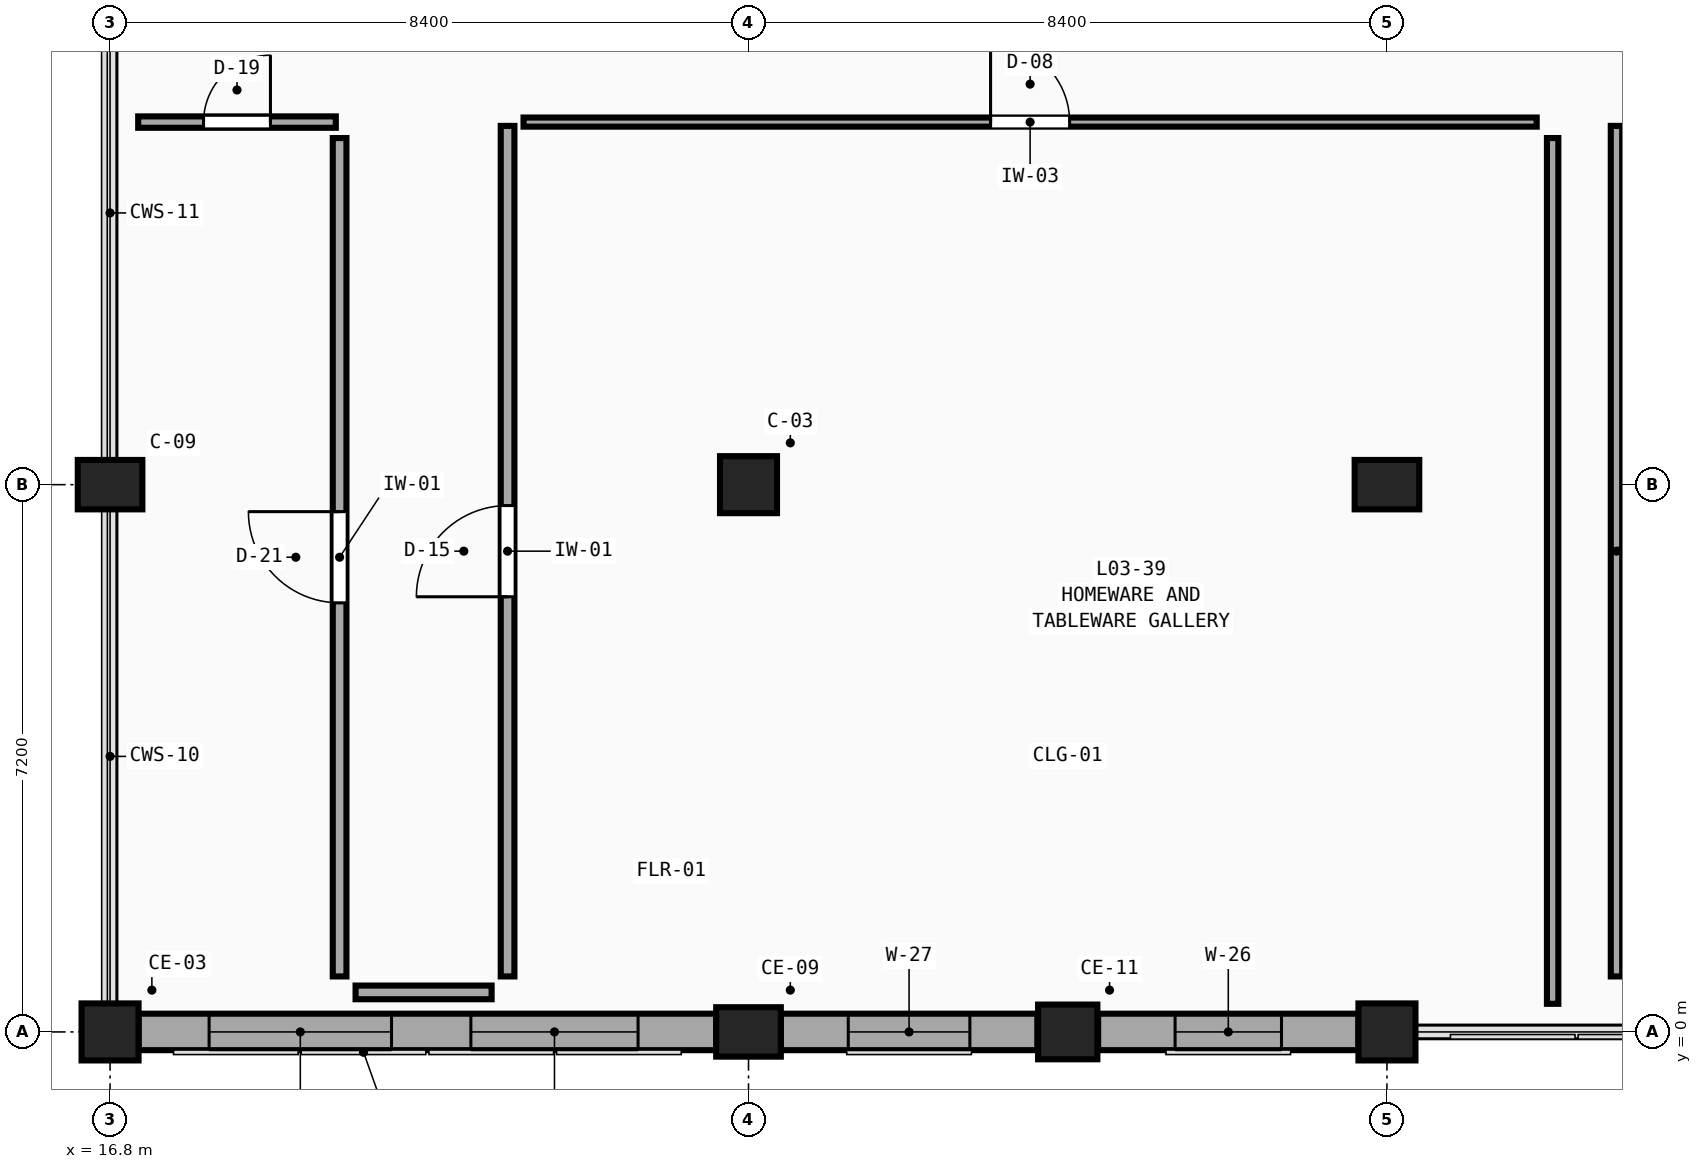
"""IFC4 building model, lengths in metres.
Left out: names, types, materials, properties, quantities, classifications, styles, units other than length and angle.
Written with IfcOpenShell. Run it as: python <this file> out.ifc"""

import sys

from ifc_helpers import new_model, si_unit, direction, frame, frame_2d, origin, origin_2d, place, context, subcontext, project, spatial, rectangle, extrude, element, fill, save


model = new_model("IFC4")
c1 = context("Model", 3, precision=1e-05, world=origin(), true_north=direction((0.0, 1.0)))
c2 = subcontext(c1, "Body", "Model", "MODEL_VIEW")
j1 = project(units=[si_unit("LENGTHUNIT", "METRE"), si_unit("PLANEANGLEUNIT", "RADIAN")], contexts=[c1])
p1 = place(None, origin())
s1 = spatial("IfcSite", under=j1, at=p1, CompositionType="ELEMENT")
p2 = place(p1, origin())
s2 = spatial("IfcBuilding", under=s1, at=p2, CompositionType="ELEMENT")
p3 = place(p2, frame((0.0, 0.0, 14.4)))
s3 = spatial("IfcBuildingStorey", under=s2, at=p3, CompositionType="ELEMENT", Elevation=14.4)
p4 = place(p3, frame((16.8, 0.0, 0.0), z_axis=(0.0, 0.0, 1.0), x_axis=(1.0, 0.0, 0.0)))
e1 = element("IfcColumn", 1, at=p4, inside=s3, PredefinedType="COLUMN", context=c2, shape_type="SweptSolid", body=[
    extrude(rectangle(XDim=0.75, YDim=0.75, at=origin_2d()), origin(), (0.0, 0.0, 1.0), 4.5),
])
for number, where, z_axis, x_axis in (
    (2, (16.8, 7.2, 0.0), (0.0, 0.0, 1.0), (1.0, 0.0, 0.0)),
    (3, (25.2, 0.0, 0.0), (0.0, 0.0, 1.0), (1.0, 0.0, 0.0)),
):
    element("IfcColumn", number, at=place(p3, frame(where, z_axis=z_axis, x_axis=x_axis)), inside=s3, PredefinedType="COLUMN", context=c2, shape_type="SweptSolid", body=[
        extrude(rectangle(XDim=0.85, YDim=0.65, at=origin_2d()), origin(), (0.0, 0.0, 1.0), 4.5),
    ])
for number, where, z_axis, x_axis in (
    (4, (25.2, 7.2, 0.0), (0.0, 0.0, 1.0), (1.0, 0.0, 0.0)),
    (5, (33.6, 0.0, 0.0), (0.0, 0.0, 1.0), (1.0, 0.0, 0.0)),
):
    element("IfcColumn", number, at=place(p3, frame(where, z_axis=z_axis, x_axis=x_axis)), inside=s3, PredefinedType="COLUMN", context=c2, shape_type="SweptSolid", body=[
        extrude(rectangle(XDim=0.75, YDim=0.75, at=origin_2d()), origin(), (0.0, 0.0, 1.0), 4.5),
    ])
p5 = place(p3, frame((33.6, 7.2, 0.0), z_axis=(0.0, 0.0, 1.0), x_axis=(1.0, 0.0, 0.0)))
e6 = element("IfcColumn", 6, at=p5, inside=s3, PredefinedType="COLUMN", context=c2, shape_type="SweptSolid", body=[
    extrude(rectangle(XDim=0.85, YDim=0.65, at=origin_2d()), origin(), (0.0, 0.0, 1.0), 4.5),
])
p6 = place(p3, frame((29.4, 0.0, 0.0), z_axis=(0.0, 0.0, 1.0), x_axis=(1.0, 0.0, 0.0)))
e7 = element("IfcColumn", 7, at=p6, inside=s3, PredefinedType="PILASTER", context=c2, shape_type="SweptSolid", body=[
    extrude(rectangle(XDim=0.78, YDim=0.72, at=origin_2d()), origin(), (0.0, 0.0, 1.0), 4.5),
])
p7 = place(p3, frame((24.775, 0.0, 0.0), z_axis=(0.0, 0.0, 1.0), x_axis=(-1.0, 0.0, 0.0)))
e8 = element("IfcWall", 8, at=p7, inside=s3, PredefinedType="SOLIDWALL", context=c2, shape_type="SweptSolid", body=[
    extrude(rectangle(XDim=7.6, YDim=0.48, at=frame_2d((3.8, 0.0))), origin(), (0.0, 0.0, 1.0), 3.63),
])
p8 = place(p7, frame((1.028, 0.0, 0.75)))
e9 = element("IfcOpeningElement", 9, at=p8, cuts=e8, PredefinedType="OPENING", context=c2, shape_type="SweptSolid", body=[
    extrude(rectangle(XDim=2.2, YDim=2.26, at=frame_2d((1.1, 1.13))), frame((0.0, 0.26, 0.0), z_axis=(0.0, -1.0, 0.0), x_axis=(1.0, 0.0, 0.0)), (0.0, 0.0, 1.0), 0.52),
])
p9 = place(p7, frame((4.272, 0.0, 0.75)))
e10 = element("IfcOpeningElement", 10, at=p9, cuts=e8, PredefinedType="OPENING", context=c2, shape_type="SweptSolid", body=[
    extrude(rectangle(XDim=2.4, YDim=2.26, at=frame_2d((1.2, 1.13))), frame((0.0, 0.26, 0.0), z_axis=(0.0, -1.0, 0.0), x_axis=(1.0, 0.0, 0.0)), (0.0, 0.0, 1.0), 0.52),
])
p10 = place(p3, frame((33.225, 0.0, 0.0), z_axis=(0.0, 0.0, 1.0), x_axis=(-1.0, 0.0, 0.0)))
e11 = element("IfcWall", 11, at=p10, inside=s3, PredefinedType="SOLIDWALL", context=c2, shape_type="SweptSolid", body=[
    extrude(rectangle(XDim=3.425, YDim=0.48, at=frame_2d((1.712, 0.0))), origin(), (0.0, 0.0, 1.0), 3.63),
])
p11 = place(p10, frame((1.012, 0.0, 0.75)))
e12 = element("IfcOpeningElement", 12, at=p11, cuts=e11, PredefinedType="OPENING", context=c2, shape_type="SweptSolid", body=[
    extrude(rectangle(XDim=1.4, YDim=2.44, at=frame_2d((0.7, 1.22))), frame((0.0, 0.26, 0.0), z_axis=(0.0, -1.0, 0.0), x_axis=(1.0, 0.0, 0.0)), (0.0, 0.0, 1.0), 0.52),
])
p12 = place(p3, frame((29.0, 0.0, 0.0), z_axis=(0.0, 0.0, 1.0), x_axis=(-1.0, 0.0, 0.0)))
e13 = element("IfcWall", 13, at=p12, inside=s3, PredefinedType="SOLIDWALL", context=c2, shape_type="SweptSolid", body=[
    extrude(rectangle(XDim=3.375, YDim=0.48, at=frame_2d((1.688, 0.0))), origin(), (0.0, 0.0, 1.0), 3.63),
])
p13 = place(p12, frame((0.887, 0.0, 0.75)))
e14 = element("IfcOpeningElement", 14, at=p13, cuts=e13, PredefinedType="OPENING", context=c2, shape_type="SweptSolid", body=[
    extrude(rectangle(XDim=1.6, YDim=2.44, at=frame_2d((0.8, 1.22))), frame((0.0, 0.26, 0.0), z_axis=(0.0, -1.0, 0.0), x_axis=(1.0, 0.0, 0.0)), (0.0, 0.0, 1.0), 0.52),
])
p14 = place(p3, frame((22.24, 11.97, 0.0), z_axis=(0.0, 0.0, 1.0), x_axis=(1.0, 0.0, 0.0)))
e15 = element("IfcWall", 15, at=p14, inside=s3, PredefinedType="PARTITIONING", context=c2, shape_type="SweptSolid", body=[
    extrude(rectangle(XDim=13.33, YDim=0.12, at=frame_2d((6.665, 0.0))), origin(), (0.0, 0.0, 1.0), 4.18),
])
p15 = place(p14, frame((6.145, 0.0, 0.0)))
e16 = element("IfcOpeningElement", 16, at=p15, cuts=e15, PredefinedType="OPENING", context=c2, shape_type="SweptSolid", body=[
    extrude(rectangle(XDim=1.04, YDim=2.13, at=frame_2d((0.52, 1.065))), frame((0.0, 0.08, 0.0), z_axis=(0.0, -1.0, 0.0), x_axis=(1.0, 0.0, 0.0)), (0.0, 0.0, 1.0), 0.16),
])
p16 = place(p3, frame((22.03, 0.73, 0.0), z_axis=(0.0, 0.0, 1.0), x_axis=(0.0, 1.0, 0.0)))
e17 = element("IfcWall", 17, at=p16, inside=s3, PredefinedType="PARTITIONING", context=c2, shape_type="SweptSolid", body=[
    extrude(rectangle(XDim=11.19, YDim=0.18, at=frame_2d((5.595, 0.0))), origin(), (0.0, 0.0, 1.0), 4.18),
])
p17 = place(p16, frame((4.995, 0.0, 0.0)))
e18 = element("IfcOpeningElement", 18, at=p17, cuts=e17, PredefinedType="OPENING", context=c2, shape_type="SweptSolid", body=[
    extrude(rectangle(XDim=1.2, YDim=2.21, at=frame_2d((0.6, 1.105))), frame((0.0, 0.11, 0.0), z_axis=(0.0, -1.0, 0.0), x_axis=(1.0, 0.0, 0.0)), (0.0, 0.0, 1.0), 0.22),
])
p18 = place(p3, frame((36.62, 0.73, 0.0), z_axis=(0.0, 0.0, 1.0), x_axis=(0.0, 1.0, 0.0)))
e19 = element("IfcWall", 19, at=p18, inside=s3, PredefinedType="PARTITIONING", context=c2, shape_type="SweptSolid", body=[
    extrude(rectangle(XDim=11.19, YDim=0.15, at=frame_2d((5.595, 0.0))), origin(), (0.0, 0.0, 1.0), 4.18),
])
p19 = place(p3, frame((19.82, 0.73, 0.0), z_axis=(0.0, 0.0, 1.0), x_axis=(0.0, 1.0, 0.0)))
e20 = element("IfcWall", 20, at=p19, inside=s3, PredefinedType="PARTITIONING", context=c2, shape_type="SweptSolid", body=[
    extrude(rectangle(XDim=11.03, YDim=0.18, at=frame_2d((5.515, 0.0))), origin(), (0.0, 0.0, 1.0), 4.18),
])
p20 = place(p19, frame((4.915, 0.0, 0.0)))
e21 = element("IfcOpeningElement", 21, at=p20, cuts=e20, PredefinedType="OPENING", context=c2, shape_type="SweptSolid", body=[
    extrude(rectangle(XDim=1.2, YDim=2.29, at=frame_2d((0.6, 1.145))), frame((0.0, 0.11, 0.0), z_axis=(0.0, -1.0, 0.0), x_axis=(1.0, 0.0, 0.0)), (0.0, 0.0, 1.0), 0.22),
])
p21 = place(p3, frame((17.17, 11.97, 0.0), z_axis=(0.0, 0.0, 1.0), x_axis=(1.0, 0.0, 0.0)))
e22 = element("IfcWall", 22, at=p21, inside=s3, PredefinedType="PARTITIONING", context=c2, shape_type="SweptSolid", body=[
    extrude(rectangle(XDim=2.6, YDim=0.15, at=frame_2d((1.3, 0.0))), origin(), (0.0, 0.0, 1.0), 4.18),
])
p22 = place(p21, frame((0.86, 0.0, 0.0)))
e23 = element("IfcOpeningElement", 23, at=p22, cuts=e22, PredefinedType="OPENING", context=c2, shape_type="SweptSolid", body=[
    extrude(rectangle(XDim=0.88, YDim=2.29, at=frame_2d((0.44, 1.145))), frame((0.0, 0.095, 0.0), z_axis=(0.0, -1.0, 0.0), x_axis=(1.0, 0.0, 0.0)), (0.0, 0.0, 1.0), 0.19),
])
p23 = place(p3, frame((20.03, 0.52, 0.0), z_axis=(0.0, 0.0, 1.0), x_axis=(1.0, 0.0, 0.0)))
e24 = element("IfcWall", 24, at=p23, inside=s3, PredefinedType="PARTITIONING", context=c2, shape_type="SweptSolid", body=[
    extrude(rectangle(XDim=1.79, YDim=0.18, at=frame_2d((0.895, 0.0))), origin(), (0.0, 0.0, 1.0), 3.63),
])
p24 = place(p3, frame((35.78, 0.37, 0.0), z_axis=(0.0, 0.0, 1.0), x_axis=(0.0, 1.0, 0.0)))
e25 = element("IfcWall", 25, at=p24, inside=s3, PredefinedType="PARTITIONING", context=c2, shape_type="SweptSolid", body=[
    extrude(rectangle(XDim=11.39, YDim=0.15, at=frame_2d((5.695, 0.0))), origin(), (0.0, 0.0, 1.0), 4.18),
])
p25 = place(p8, origin())
e26 = element("IfcWindow", 26, at=p25, inside=s3, PartitioningType="TRIPLE_PANEL_VERTICAL", PredefinedType="WINDOW", context=c2, shape_type="SweptSolid", body=[
    extrude(rectangle(XDim=2.2, YDim=2.26, at=frame_2d((1.1, 1.13))), frame((0.0, 0.03, 0.0), z_axis=(0.0, -1.0, 0.0), x_axis=(1.0, 0.0, 0.0)), (0.0, 0.0, 1.0), 0.06),
])
fill(e9, e26)
p26 = place(p9, origin())
e27 = element("IfcWindow", 27, at=p26, inside=s3, PartitioningType="TRIPLE_PANEL_VERTICAL", PredefinedType="WINDOW", context=c2, shape_type="SweptSolid", body=[
    extrude(rectangle(XDim=2.4, YDim=2.26, at=frame_2d((1.2, 1.13))), frame((0.0, 0.03, 0.0), z_axis=(0.0, -1.0, 0.0), x_axis=(1.0, 0.0, 0.0)), (0.0, 0.0, 1.0), 0.06),
])
fill(e10, e27)
p27 = place(p11, origin())
e28 = element("IfcWindow", 28, at=p27, inside=s3, PartitioningType="DOUBLE_PANEL_VERTICAL", PredefinedType="WINDOW", context=c2, shape_type="SweptSolid", body=[
    extrude(rectangle(XDim=1.4, YDim=2.44, at=frame_2d((0.7, 1.22))), frame((0.0, 0.03, 0.0), z_axis=(0.0, -1.0, 0.0), x_axis=(1.0, 0.0, 0.0)), (0.0, 0.0, 1.0), 0.06),
])
fill(e12, e28)
p28 = place(p13, origin())
e29 = element("IfcWindow", 29, at=p28, inside=s3, PartitioningType="DOUBLE_PANEL_VERTICAL", PredefinedType="WINDOW", context=c2, shape_type="SweptSolid", body=[
    extrude(rectangle(XDim=1.6, YDim=2.44, at=frame_2d((0.8, 1.22))), frame((0.0, 0.03, 0.0), z_axis=(0.0, -1.0, 0.0), x_axis=(1.0, 0.0, 0.0)), (0.0, 0.0, 1.0), 0.06),
])
fill(e14, e29)
p29 = place(p15, origin())
e30 = element("IfcDoor", 30, at=p29, inside=s3, OperationType="SINGLE_SWING_LEFT", PredefinedType="DOOR", context=c2, shape_type="SweptSolid", body=[
    extrude(rectangle(XDim=1.04, YDim=2.13, at=frame_2d((0.52, 1.065))), frame((0.0, 0.025, 0.0), z_axis=(0.0, -1.0, 0.0), x_axis=(1.0, 0.0, 0.0)), (0.0, 0.0, 1.0), 0.05),
])
fill(e16, e30)
p30 = place(p17, origin())
e31 = element("IfcDoor", 31, at=p30, inside=s3, OperationType="SINGLE_SWING_LEFT", PredefinedType="DOOR", context=c2, shape_type="SweptSolid", body=[
    extrude(rectangle(XDim=1.2, YDim=2.21, at=frame_2d((0.6, 1.105))), frame((0.0, 0.025, 0.0), z_axis=(0.0, -1.0, 0.0), x_axis=(1.0, 0.0, 0.0)), (0.0, 0.0, 1.0), 0.05),
])
fill(e18, e31)
p31 = place(p20, origin())
e32 = element("IfcDoor", 32, at=p31, inside=s3, OperationType="SINGLE_SWING_RIGHT", PredefinedType="DOOR", context=c2, shape_type="SweptSolid", body=[
    extrude(rectangle(XDim=1.2, YDim=2.29, at=frame_2d((0.6, 1.145))), frame((0.0, 0.025, 0.0), z_axis=(0.0, -1.0, 0.0), x_axis=(1.0, 0.0, 0.0)), (0.0, 0.0, 1.0), 0.05),
])
fill(e21, e32)
p32 = place(p22, origin())
e33 = element("IfcDoor", 33, at=p32, inside=s3, OperationType="SINGLE_SWING_RIGHT", PredefinedType="DOOR", context=c2, shape_type="SweptSolid", body=[
    extrude(rectangle(XDim=0.88, YDim=2.29, at=frame_2d((0.44, 1.145))), frame((0.0, 0.025, 0.0), z_axis=(0.0, -1.0, 0.0), x_axis=(1.0, 0.0, 0.0)), (0.0, 0.0, 1.0), 0.05),
])
fill(e23, e33)
save(model, sys.argv[1])
